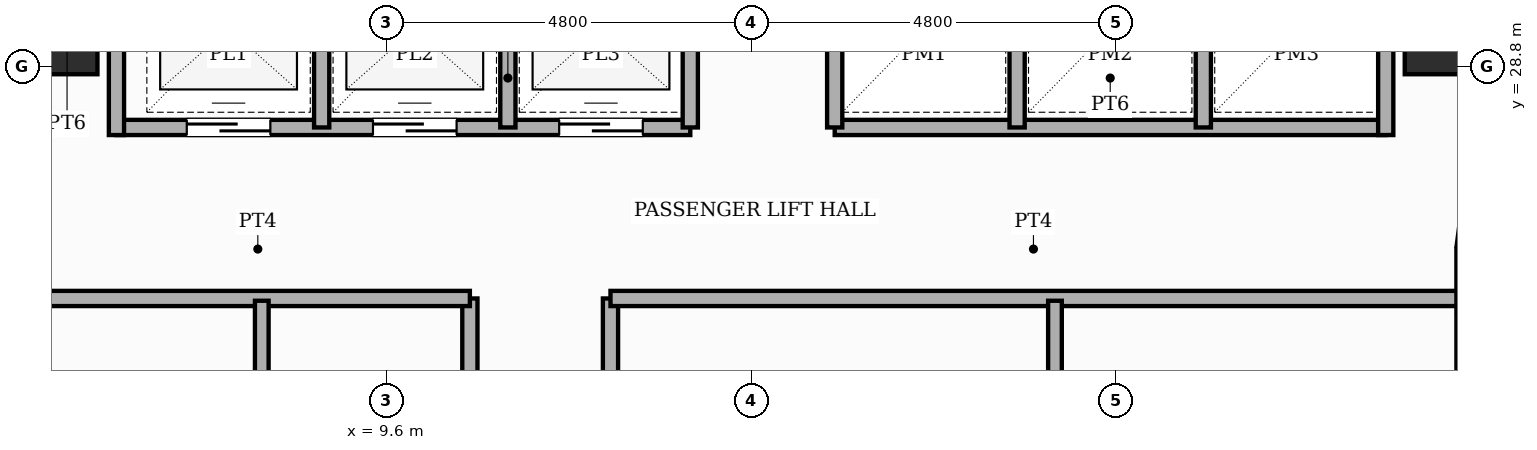
"""IFC4 building model, lengths in metres.
Left out: names, types, materials, properties, quantities, classifications, styles, units other than length and angle.
Written with IfcOpenShell. Run it as: python <this file> out.ifc"""

import sys

from ifc_helpers import new_model, si_unit, direction, frame, frame_2d, origin, origin_2d, place, context, subcontext, project, spatial, rectangle, extrude, element, fill, save


model = new_model("IFC4")
c1 = context("Model", 3, precision=1e-05, world=origin(), true_north=direction((0.0, 1.0)))
c2 = subcontext(c1, "Body", "Model", "MODEL_VIEW")
j1 = project(units=[si_unit("LENGTHUNIT", "METRE"), si_unit("PLANEANGLEUNIT", "RADIAN")], contexts=[c1])
p1 = place(None, origin())
s1 = spatial("IfcSite", under=j1, at=p1, CompositionType="ELEMENT")
p2 = place(p1, origin())
s2 = spatial("IfcBuilding", under=s1, at=p2, CompositionType="ELEMENT")
p3 = place(p2, frame((0.0, 0.0, 35.8)))
s3 = spatial("IfcBuildingStorey", under=s2, at=p3, CompositionType="ELEMENT", Elevation=35.8)
for number, where, z_axis, x_axis in (
    (1, (5.25, 29.25, 0.0), (0.0, 0.0, 1.0), (1.0, 0.0, 0.0)),
    (2, (23.55, 29.25, 0.0), (0.0, 0.0, 1.0), (1.0, 0.0, 0.0)),
):
    element("IfcColumn", number, at=place(p3, frame(where, z_axis=z_axis, x_axis=x_axis)), inside=s3, PredefinedType="COLUMN", context=c2, shape_type="SweptSolid", body=[
        extrude(rectangle(XDim=1.1, YDim=1.1, at=origin_2d()), origin(), (0.0, 0.0, 1.0), 3.6),
    ])
p4 = place(p3, frame((23.923, 27.042, 0.0), z_axis=(0.0, 0.0, 1.0), x_axis=(-0.130555323746, -0.9914410257, 0.0)))
e3 = element("IfcWall", 3, at=p4, inside=s3, PredefinedType="STANDARD", context=c2, shape_type="SweptSolid", body=[
    extrude(rectangle(XDim=0.626, YDim=0.32, at=frame_2d((0.313, 0.0))), origin(), (0.0, 0.0, 1.0), 2.53),
])
p5 = place(p3, frame((23.84, 26.4, 0.0), z_axis=(0.0, 0.0, 1.0), x_axis=(0.0, -1.0, 0.0)))
e4 = element("IfcWall", 4, at=p5, inside=s3, PredefinedType="STANDARD", context=c2, shape_type="SweptSolid", body=[
    extrude(rectangle(XDim=19.2, YDim=0.32, at=frame_2d((9.6, 0.0))), origin(), (0.0, 0.0, 1.0), 2.53),
])
p6 = place(p5, frame((15.415, 0.0, 0.45)))
e5 = element("IfcOpeningElement", 5, at=p6, cuts=e4, PredefinedType="OPENING", context=c2, shape_type="SweptSolid", body=[
    extrude(rectangle(XDim=0.6, YDim=1.8, at=frame_2d((0.3, 0.9))), frame((0.0, 0.17, 0.0), z_axis=(0.0, -1.0, 0.0), x_axis=(1.0, 0.0, 0.0)), (0.0, 0.0, 1.0), 0.34),
])
p7 = place(p5, frame((13.43, 0.0, 0.65)))
e6 = element("IfcOpeningElement", 6, at=p7, cuts=e4, PredefinedType="OPENING", context=c2, shape_type="SweptSolid", body=[
    extrude(rectangle(XDim=1.4, YDim=1.1, at=frame_2d((0.7, 0.55))), frame((0.0, 0.17, 0.0), z_axis=(0.0, -1.0, 0.0), x_axis=(1.0, 0.0, 0.0)), (0.0, 0.0, 1.0), 0.34),
])
p8 = place(p5, frame((8.21, 0.0, 0.45)))
e7 = element("IfcOpeningElement", 7, at=p8, cuts=e4, PredefinedType="OPENING", context=c2, shape_type="SweptSolid", body=[
    extrude(rectangle(XDim=0.95, YDim=1.8, at=frame_2d((0.475, 0.9))), frame((0.0, 0.17, 0.0), z_axis=(0.0, -1.0, 0.0), x_axis=(1.0, 0.0, 0.0)), (0.0, 0.0, 1.0), 0.34),
])
p9 = place(p5, frame((3.285, 0.0, 0.65)))
e8 = element("IfcOpeningElement", 8, at=p9, cuts=e4, PredefinedType="OPENING", context=c2, shape_type="SweptSolid", body=[
    extrude(rectangle(XDim=1.4, YDim=1.1, at=frame_2d((0.7, 0.55))), frame((0.0, 0.17, 0.0), z_axis=(0.0, -1.0, 0.0), x_axis=(1.0, 0.0, 0.0)), (0.0, 0.0, 1.0), 0.34),
])
p10 = place(p5, frame((10.04, 0.0, 0.45)))
e9 = element("IfcOpeningElement", 9, at=p10, cuts=e4, PredefinedType="OPENING", context=c2, shape_type="SweptSolid", body=[
    extrude(rectangle(XDim=0.95, YDim=1.8, at=frame_2d((0.475, 0.9))), frame((0.0, 0.17, 0.0), z_axis=(0.0, -1.0, 0.0), x_axis=(1.0, 0.0, 0.0)), (0.0, 0.0, 1.0), 0.34),
])
p11 = place(p5, frame((5.32, 0.0, 0.45)))
e10 = element("IfcOpeningElement", 10, at=p11, cuts=e4, PredefinedType="OPENING", context=c2, shape_type="SweptSolid", body=[
    extrude(rectangle(XDim=0.95, YDim=1.8, at=frame_2d((0.475, 0.9))), frame((0.0, 0.17, 0.0), z_axis=(0.0, -1.0, 0.0), x_axis=(1.0, 0.0, 0.0)), (0.0, 0.0, 1.0), 0.34),
])
p12 = place(p5, frame((0.88, 0.0, 0.45)))
e11 = element("IfcOpeningElement", 11, at=p12, cuts=e4, PredefinedType="OPENING", context=c2, shape_type="SweptSolid", body=[
    extrude(rectangle(XDim=0.75, YDim=1.8, at=frame_2d((0.375, 0.9))), frame((0.0, 0.17, 0.0), z_axis=(0.0, -1.0, 0.0), x_axis=(1.0, 0.0, 0.0)), (0.0, 0.0, 1.0), 0.34),
])
p13 = place(p3, frame((6.05, 28.0, 0.0), z_axis=(0.0, 0.0, 1.0), x_axis=(1.0, 0.0, 0.0)))
e12 = element("IfcWall", 12, at=p13, inside=s3, PredefinedType="POLYGONAL", context=c2, shape_type="SweptSolid", body=[
    extrude(rectangle(XDim=7.55, YDim=0.2, at=frame_2d((3.775, 0.0))), origin(), (0.0, 0.0, 1.0), 3.35),
])
p14 = place(p13, frame((0.925, 0.0, 0.0)))
e13 = element("IfcOpeningElement", 13, at=p14, cuts=e12, PredefinedType="OPENING", context=c2, shape_type="SweptSolid", body=[
    extrude(rectangle(XDim=1.1, YDim=2.15, at=frame_2d((0.55, 1.075))), frame((0.0, 0.11, 0.0), z_axis=(0.0, -1.0, 0.0), x_axis=(1.0, 0.0, 0.0)), (0.0, 0.0, 1.0), 0.22),
])
p15 = place(p13, frame((3.375, 0.0, 0.0)))
e14 = element("IfcOpeningElement", 14, at=p15, cuts=e12, PredefinedType="OPENING", context=c2, shape_type="SweptSolid", body=[
    extrude(rectangle(XDim=1.1, YDim=2.15, at=frame_2d((0.55, 1.075))), frame((0.0, 0.11, 0.0), z_axis=(0.0, -1.0, 0.0), x_axis=(1.0, 0.0, 0.0)), (0.0, 0.0, 1.0), 0.22),
])
p16 = place(p13, frame((5.825, 0.0, 0.0)))
e15 = element("IfcOpeningElement", 15, at=p16, cuts=e12, PredefinedType="OPENING", context=c2, shape_type="SweptSolid", body=[
    extrude(rectangle(XDim=1.1, YDim=2.15, at=frame_2d((0.55, 1.075))), frame((0.0, 0.11, 0.0), z_axis=(0.0, -1.0, 0.0), x_axis=(1.0, 0.0, 0.0)), (0.0, 0.0, 1.0), 0.22),
])
p17 = place(p3, frame((15.5, 28.0, 0.0), z_axis=(0.0, 0.0, 1.0), x_axis=(1.0, 0.0, 0.0)))
e16 = element("IfcWall", 16, at=p17, inside=s3, PredefinedType="POLYGONAL", context=c2, shape_type="SweptSolid", body=[
    extrude(rectangle(XDim=7.25, YDim=0.2, at=frame_2d((3.625, 0.0))), origin(), (0.0, 0.0, 1.0), 3.35),
])
for number, where, z_axis, x_axis in (
    (17, (6.05, 27.9, 0.0), (0.0, 0.0, 1.0), (0.0, 1.0, 0.0)),
    (18, (22.75, 27.9, 0.0), (0.0, 0.0, 1.0), (0.0, 1.0, 0.0)),
):
    element("IfcWall", number, at=place(p3, frame(where, z_axis=z_axis, x_axis=x_axis)), inside=s3, PredefinedType="POLYGONAL", context=c2, shape_type="SweptSolid", body=[
        extrude(rectangle(XDim=3.0, YDim=0.2, at=frame_2d((1.5, 0.0))), origin(), (0.0, 0.0, 1.0), 3.35),
    ])
for number, where, z_axis, x_axis in (
    (19, (13.6, 28.0, 0.0), (0.0, 0.0, 1.0), (0.0, 1.0, 0.0)),
    (20, (15.5, 28.0, 0.0), (0.0, 0.0, 1.0), (0.0, 1.0, 0.0)),
    (21, (8.75, 28.0, 0.0), (0.0, 0.0, 1.0), (0.0, 1.0, 0.0)),
    (22, (11.2, 28.0, 0.0), (0.0, 0.0, 1.0), (0.0, 1.0, 0.0)),
    (23, (17.9, 28.0, 0.0), (0.0, 0.0, 1.0), (0.0, 1.0, 0.0)),
    (24, (20.35, 28.0, 0.0), (0.0, 0.0, 1.0), (0.0, 1.0, 0.0)),
):
    element("IfcWall", number, at=place(p3, frame(where, z_axis=z_axis, x_axis=x_axis)), inside=s3, PredefinedType="POLYGONAL", context=c2, shape_type="SweptSolid", body=[
        extrude(rectangle(XDim=2.9, YDim=0.2, at=frame_2d((1.45, 0.0))), origin(), (0.0, 0.0, 1.0), 3.35),
    ])
p18 = place(p3, frame((10.7, 5.12, 0.0), z_axis=(0.0, 0.0, 1.0), x_axis=(0.0, 1.0, 0.0)))
e25 = element("IfcWall", 25, at=p18, inside=s3, PredefinedType="PARTITIONING", context=c2, shape_type="SweptSolid", body=[
    extrude(rectangle(XDim=20.63, YDim=0.2, at=frame_2d((10.315, 0.0))), origin(), (0.0, 0.0, 1.0), 3.35),
])
p19 = place(p18, frame((1.028, 0.0, 0.0)))
e26 = element("IfcOpeningElement", 26, at=p19, cuts=e25, PredefinedType="OPENING", context=c2, shape_type="SweptSolid", body=[
    extrude(rectangle(XDim=0.98, YDim=2.18, at=frame_2d((0.49, 1.09))), frame((0.0, 0.11, 0.0), z_axis=(0.0, -1.0, 0.0), x_axis=(1.0, 0.0, 0.0)), (0.0, 0.0, 1.0), 0.22),
])
p20 = place(p18, frame((9.747, 0.0, 0.0)))
e27 = element("IfcOpeningElement", 27, at=p20, cuts=e25, PredefinedType="OPENING", context=c2, shape_type="SweptSolid", body=[
    extrude(rectangle(XDim=0.98, YDim=2.18, at=frame_2d((0.49, 1.09))), frame((0.0, 0.11, 0.0), z_axis=(0.0, -1.0, 0.0), x_axis=(1.0, 0.0, 0.0)), (0.0, 0.0, 1.0), 0.22),
])
p21 = place(p18, frame((15.956, 0.0, 0.0)))
e28 = element("IfcOpeningElement", 28, at=p21, cuts=e25, PredefinedType="OPENING", context=c2, shape_type="SweptSolid", body=[
    extrude(rectangle(XDim=0.98, YDim=2.18, at=frame_2d((0.49, 1.09))), frame((0.0, 0.11, 0.0), z_axis=(0.0, -1.0, 0.0), x_axis=(1.0, 0.0, 0.0)), (0.0, 0.0, 1.0), 0.22),
])
p22 = place(p3, frame((12.55, 5.12, 0.0), z_axis=(0.0, 0.0, 1.0), x_axis=(0.0, 1.0, 0.0)))
e29 = element("IfcWall", 29, at=p22, inside=s3, PredefinedType="PARTITIONING", context=c2, shape_type="SweptSolid", body=[
    extrude(rectangle(XDim=20.63, YDim=0.2, at=frame_2d((10.315, 0.0))), origin(), (0.0, 0.0, 1.0), 3.35),
])
p23 = place(p22, frame((1.004, 0.0, 0.0)))
e30 = element("IfcOpeningElement", 30, at=p23, cuts=e29, PredefinedType="OPENING", context=c2, shape_type="SweptSolid", body=[
    extrude(rectangle(XDim=0.98, YDim=2.18, at=frame_2d((0.49, 1.09))), frame((0.0, 0.11, 0.0), z_axis=(0.0, -1.0, 0.0), x_axis=(1.0, 0.0, 0.0)), (0.0, 0.0, 1.0), 0.22),
])
p24 = place(p22, frame((6.68, 0.0, 0.0)))
e31 = element("IfcOpeningElement", 31, at=p24, cuts=e29, PredefinedType="OPENING", context=c2, shape_type="SweptSolid", body=[
    extrude(rectangle(XDim=0.98, YDim=2.18, at=frame_2d((0.49, 1.09))), frame((0.0, 0.11, 0.0), z_axis=(0.0, -1.0, 0.0), x_axis=(1.0, 0.0, 0.0)), (0.0, 0.0, 1.0), 0.22),
])
p25 = place(p22, frame((12.715, 0.0, 0.0)))
e32 = element("IfcOpeningElement", 32, at=p25, cuts=e29, PredefinedType="OPENING", context=c2, shape_type="SweptSolid", body=[
    extrude(rectangle(XDim=0.98, YDim=2.18, at=frame_2d((0.49, 1.09))), frame((0.0, 0.11, 0.0), z_axis=(0.0, -1.0, 0.0), x_axis=(1.0, 0.0, 0.0)), (0.0, 0.0, 1.0), 0.22),
])
p26 = place(p22, frame((16.88, 0.0, 0.0)))
e33 = element("IfcOpeningElement", 33, at=p26, cuts=e29, PredefinedType="OPENING", context=c2, shape_type="SweptSolid", body=[
    extrude(rectangle(XDim=0.98, YDim=2.18, at=frame_2d((0.49, 1.09))), frame((0.0, 0.11, 0.0), z_axis=(0.0, -1.0, 0.0), x_axis=(1.0, 0.0, 0.0)), (0.0, 0.0, 1.0), 0.22),
])
p27 = place(p3, frame((5.12, 25.75, 0.0), z_axis=(0.0, 0.0, 1.0), x_axis=(1.0, 0.0, 0.0)))
e34 = element("IfcWall", 34, at=p27, inside=s3, PredefinedType="PARTITIONING", context=c2, shape_type="SweptSolid", body=[
    extrude(rectangle(XDim=5.58, YDim=0.2, at=frame_2d((2.79, 0.0))), origin(), (0.0, 0.0, 1.0), 3.35),
])
p28 = place(p3, frame((12.55, 25.75, 0.0), z_axis=(0.0, 0.0, 1.0), x_axis=(1.0, 0.0, 0.0)))
e35 = element("IfcWall", 35, at=p28, inside=s3, PredefinedType="PARTITIONING", context=c2, shape_type="SweptSolid", body=[
    extrude(rectangle(XDim=11.13, YDim=0.2, at=frame_2d((5.565, 0.0))), origin(), (0.0, 0.0, 1.0), 3.35),
])
p29 = place(p3, frame((7.962, 22.892, 0.0), z_axis=(0.0, 0.0, 1.0), x_axis=(0.0, 1.0, 0.0)))
e36 = element("IfcWall", 36, at=p29, inside=s3, PredefinedType="PLUMBINGWALL", context=c2, shape_type="SweptSolid", body=[
    extrude(rectangle(XDim=2.828, YDim=0.18, at=frame_2d((1.414, 0.0))), origin(), (0.0, 0.0, 1.0), 3.35),
])
p30 = place(p3, frame((18.398, 23.54, 0.0), z_axis=(0.0, 0.0, 1.0), x_axis=(0.0, 1.0, 0.0)))
e37 = element("IfcWall", 37, at=p30, inside=s3, PredefinedType="PLUMBINGWALL", context=c2, shape_type="SweptSolid", body=[
    extrude(rectangle(XDim=2.18, YDim=0.18, at=frame_2d((1.09, 0.0))), origin(), (0.0, 0.0, 1.0), 3.35),
])
p31 = place(p14, origin())
e38 = element("IfcDoor", 38, at=p31, inside=s3, OperationType="SLIDING_TO_LEFT", PredefinedType="DOOR", context=c2, shape_type="SweptSolid", body=[
    extrude(rectangle(XDim=1.1, YDim=2.15, at=frame_2d((0.55, 1.075))), frame((0.0, 0.025, 0.0), z_axis=(0.0, -1.0, 0.0), x_axis=(1.0, 0.0, 0.0)), (0.0, 0.0, 1.0), 0.05),
])
fill(e13, e38)
p32 = place(p15, origin())
e39 = element("IfcDoor", 39, at=p32, inside=s3, OperationType="SLIDING_TO_RIGHT", PredefinedType="DOOR", context=c2, shape_type="SweptSolid", body=[
    extrude(rectangle(XDim=1.1, YDim=2.15, at=frame_2d((0.55, 1.075))), frame((0.0, 0.025, 0.0), z_axis=(0.0, -1.0, 0.0), x_axis=(1.0, 0.0, 0.0)), (0.0, 0.0, 1.0), 0.05),
])
fill(e14, e39)
p33 = place(p16, origin())
e40 = element("IfcDoor", 40, at=p33, inside=s3, OperationType="SLIDING_TO_LEFT", PredefinedType="DOOR", context=c2, shape_type="SweptSolid", body=[
    extrude(rectangle(XDim=1.1, YDim=2.15, at=frame_2d((0.55, 1.075))), frame((0.0, 0.025, 0.0), z_axis=(0.0, -1.0, 0.0), x_axis=(1.0, 0.0, 0.0)), (0.0, 0.0, 1.0), 0.05),
])
fill(e15, e40)
save(model, sys.argv[1])
